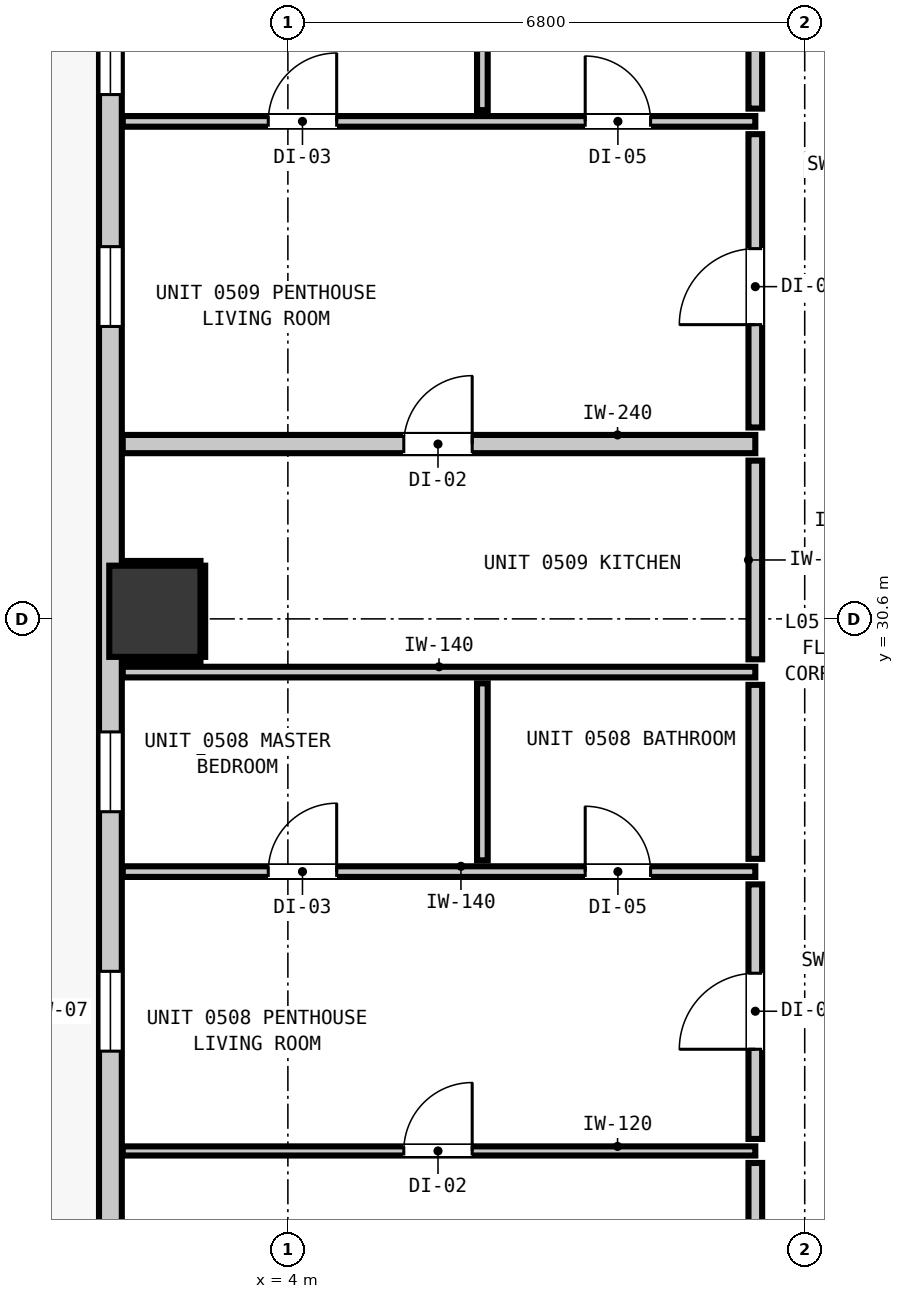
"""IFC4 building model, lengths in metres.
Left out: names, types, materials, properties, quantities, classifications, styles, units other than length and angle.
Written with IfcOpenShell. Run it as: python <this file> out.ifc"""

import sys

from ifc_helpers import new_model, si_unit, direction, frame, frame_2d, origin, origin_2d, place, context, subcontext, project, spatial, rectangle, extrude, element, fill, save


model = new_model("IFC4")
c1 = context("Model", 3, precision=1e-05, world=origin(), true_north=direction((0.0, 1.0)))
c2 = subcontext(c1, "Body", "Model", "MODEL_VIEW")
j1 = project(units=[si_unit("LENGTHUNIT", "METRE"), si_unit("PLANEANGLEUNIT", "RADIAN")], contexts=[c1])
p1 = place(None, origin())
s1 = spatial("IfcSite", under=j1, at=p1, CompositionType="ELEMENT")
p2 = place(p1, origin())
s2 = spatial("IfcBuilding", under=s1, at=p2, CompositionType="ELEMENT")
p3 = place(p2, frame((0.0, 0.0, 22.0)))
s3 = spatial("IfcBuildingStorey", under=s2, at=p3, CompositionType="ELEMENT", Elevation=22.0)
p4 = place(p3, frame((2.25, 30.7, -0.2), z_axis=(0.0, 0.0, 1.0), x_axis=(1.0, 0.0, 0.0)))
e1 = element("IfcColumn", 1, at=p4, inside=s3, PredefinedType="COLUMN", context=c2, shape_type="SweptSolid", body=[
    extrude(rectangle(XDim=1.2, YDim=1.2, at=origin_2d()), origin(), (0.0, 0.0, 1.0), 3.52),
])
p5 = place(p3, frame((1.665, 10.165, 0.0), z_axis=(0.0, 0.0, 1.0), x_axis=(0.0, 1.0, 0.0)))
e2 = element("IfcWall", 2, at=p5, inside=s3, PredefinedType="STANDARD", context=c2, shape_type="SweptSolid", body=[
    extrude(rectangle(XDim=34.67, YDim=0.3, at=frame_2d((17.335, 0.0))), origin(), (0.0, 0.0, 1.0), 3.06),
])
p6 = place(p5, frame((3.352, 0.0, 0.0)))
e3 = element("IfcOpeningElement", 3, at=p6, cuts=e2, PredefinedType="OPENING", context=c2, shape_type="SweptSolid", body=[
    extrude(rectangle(XDim=1.0, YDim=2.15, at=frame_2d((0.5, 1.075))), frame((0.0, 0.16, 0.0), z_axis=(0.0, -1.0, 0.0), x_axis=(1.0, 0.0, 0.0)), (0.0, 0.0, 1.0), 0.32),
])
p7 = place(p5, frame((14.748, 0.0, 0.85)))
e4 = element("IfcOpeningElement", 4, at=p7, cuts=e2, PredefinedType="OPENING", context=c2, shape_type="SweptSolid", body=[
    extrude(rectangle(XDim=1.05, YDim=1.65, at=frame_2d((0.525, 0.825))), frame((0.0, 0.16, 0.0), z_axis=(0.0, -1.0, 0.0), x_axis=(1.0, 0.0, 0.0)), (0.0, 0.0, 1.0), 0.32),
])
p8 = place(p5, frame((17.898, 0.0, 0.85)))
e5 = element("IfcOpeningElement", 5, at=p8, cuts=e2, PredefinedType="OPENING", context=c2, shape_type="SweptSolid", body=[
    extrude(rectangle(XDim=1.05, YDim=1.65, at=frame_2d((0.525, 0.825))), frame((0.0, 0.16, 0.0), z_axis=(0.0, -1.0, 0.0), x_axis=(1.0, 0.0, 0.0)), (0.0, 0.0, 1.0), 0.32),
])
p9 = place(p5, frame((24.282, 0.0, 0.85)))
e6 = element("IfcOpeningElement", 6, at=p9, cuts=e2, PredefinedType="OPENING", context=c2, shape_type="SweptSolid", body=[
    extrude(rectangle(XDim=1.05, YDim=1.65, at=frame_2d((0.525, 0.825))), frame((0.0, 0.16, 0.0), z_axis=(0.0, -1.0, 0.0), x_axis=(1.0, 0.0, 0.0)), (0.0, 0.0, 1.0), 0.32),
])
p10 = place(p5, frame((27.333, 0.0, 0.85)))
e7 = element("IfcOpeningElement", 7, at=p10, cuts=e2, PredefinedType="OPENING", context=c2, shape_type="SweptSolid", body=[
    extrude(rectangle(XDim=1.05, YDim=1.65, at=frame_2d((0.525, 0.825))), frame((0.0, 0.16, 0.0), z_axis=(0.0, -1.0, 0.0), x_axis=(1.0, 0.0, 0.0)), (0.0, 0.0, 1.0), 0.32),
])
p11 = place(p3, frame((1.827, 32.9, 0.0), z_axis=(0.0, 0.0, 1.0), x_axis=(1.0, 0.0, 0.0)))
e8 = element("IfcWall", 8, at=p11, inside=s3, PredefinedType="PARTITIONING", context=c2, shape_type="SweptSolid", body=[
    extrude(rectangle(XDim=8.323, YDim=0.24, at=frame_2d((4.162, 0.0))), origin(), (0.0, 0.0, 1.0), 3.06),
])
p12 = place(p11, frame((3.698, 0.0, 0.0)))
e9 = element("IfcOpeningElement", 9, at=p12, cuts=e8, PredefinedType="OPENING", context=c2, shape_type="SweptSolid", body=[
    extrude(rectangle(XDim=0.9, YDim=2.1, at=frame_2d((0.45, 1.05))), frame((0.0, 0.13, 0.0), z_axis=(0.0, -1.0, 0.0), x_axis=(1.0, 0.0, 0.0)), (0.0, 0.0, 1.0), 0.26),
])
p13 = place(p3, frame((1.827, 27.275, 0.0), z_axis=(0.0, 0.0, 1.0), x_axis=(1.0, 0.0, 0.0)))
e10 = element("IfcWall", 10, at=p13, inside=s3, PredefinedType="PARTITIONING", context=c2, shape_type="SweptSolid", body=[
    extrude(rectangle(XDim=8.323, YDim=0.14, at=frame_2d((4.162, 0.0))), origin(), (0.0, 0.0, 1.0), 3.06),
])
p14 = place(p13, frame((6.085, 0.0, 0.0)))
e11 = element("IfcOpeningElement", 11, at=p14, cuts=e10, PredefinedType="OPENING", context=c2, shape_type="SweptSolid", body=[
    extrude(rectangle(XDim=0.86, YDim=2.02, at=frame_2d((0.43, 1.01))), frame((0.0, 0.08, 0.0), z_axis=(0.0, -1.0, 0.0), x_axis=(1.0, 0.0, 0.0)), (0.0, 0.0, 1.0), 0.16),
])
p15 = place(p13, frame((1.915, 0.0, 0.0)))
e12 = element("IfcOpeningElement", 12, at=p15, cuts=e10, PredefinedType="OPENING", context=c2, shape_type="SweptSolid", body=[
    extrude(rectangle(XDim=0.9, YDim=2.1, at=frame_2d((0.45, 1.05))), frame((0.0, 0.08, 0.0), z_axis=(0.0, -1.0, 0.0), x_axis=(1.0, 0.0, 0.0)), (0.0, 0.0, 1.0), 0.16),
])
p16 = place(p3, frame((1.827, 29.9, 0.0), z_axis=(0.0, 0.0, 1.0), x_axis=(1.0, 0.0, 0.0)))
e13 = element("IfcWall", 13, at=p16, inside=s3, PredefinedType="PARTITIONING", context=c2, shape_type="SweptSolid", body=[
    extrude(rectangle(XDim=8.323, YDim=0.14, at=frame_2d((4.162, 0.0))), origin(), (0.0, 0.0, 1.0), 3.06),
])
p17 = place(p3, frame((1.827, 37.145, 0.0), z_axis=(0.0, 0.0, 1.0), x_axis=(1.0, 0.0, 0.0)))
e14 = element("IfcWall", 14, at=p17, inside=s3, PredefinedType="PARTITIONING", context=c2, shape_type="SweptSolid", body=[
    extrude(rectangle(XDim=8.323, YDim=0.14, at=frame_2d((4.162, 0.0))), origin(), (0.0, 0.0, 1.0), 3.06),
])
p18 = place(p17, frame((6.085, 0.0, 0.0)))
e15 = element("IfcOpeningElement", 15, at=p18, cuts=e14, PredefinedType="OPENING", context=c2, shape_type="SweptSolid", body=[
    extrude(rectangle(XDim=0.86, YDim=2.02, at=frame_2d((0.43, 1.01))), frame((0.0, 0.08, 0.0), z_axis=(0.0, -1.0, 0.0), x_axis=(1.0, 0.0, 0.0)), (0.0, 0.0, 1.0), 0.16),
])
p19 = place(p17, frame((1.915, 0.0, 0.0)))
e16 = element("IfcOpeningElement", 16, at=p19, cuts=e14, PredefinedType="OPENING", context=c2, shape_type="SweptSolid", body=[
    extrude(rectangle(XDim=0.9, YDim=2.1, at=frame_2d((0.45, 1.05))), frame((0.0, 0.08, 0.0), z_axis=(0.0, -1.0, 0.0), x_axis=(1.0, 0.0, 0.0)), (0.0, 0.0, 1.0), 0.16),
])
p20 = place(p3, frame((1.827, 23.6, 0.0), z_axis=(0.0, 0.0, 1.0), x_axis=(1.0, 0.0, 0.0)))
e17 = element("IfcWall", 17, at=p20, inside=s3, PredefinedType="PARTITIONING", context=c2, shape_type="SweptSolid", body=[
    extrude(rectangle(XDim=8.323, YDim=0.12, at=frame_2d((4.162, 0.0))), origin(), (0.0, 0.0, 1.0), 3.06),
])
p21 = place(p20, frame((3.698, 0.0, 0.0)))
e18 = element("IfcOpeningElement", 18, at=p21, cuts=e17, PredefinedType="OPENING", context=c2, shape_type="SweptSolid", body=[
    extrude(rectangle(XDim=0.9, YDim=2.1, at=frame_2d((0.45, 1.05))), frame((0.0, 0.07, 0.0), z_axis=(0.0, -1.0, 0.0), x_axis=(1.0, 0.0, 0.0)), (0.0, 0.0, 1.0), 0.14),
])
p22 = place(p3, frame((10.15, 21.368, 0.0), z_axis=(0.0, 0.0, 1.0), x_axis=(0.0, 1.0, 0.0)))
e19 = element("IfcWall", 19, at=p22, inside=s3, PredefinedType="PARTITIONING", context=c2, shape_type="SweptSolid", body=[
    extrude(rectangle(XDim=2.074, YDim=0.18, at=frame_2d((1.037, 0.0))), origin(), (0.0, 0.0, 1.0), 3.06),
])
p23 = place(p3, frame((10.15, 23.758, 0.0), z_axis=(0.0, 0.0, 1.0), x_axis=(0.0, 1.0, 0.0)))
e20 = element("IfcWall", 20, at=p23, inside=s3, PredefinedType="PARTITIONING", context=c2, shape_type="SweptSolid", body=[
    extrude(rectangle(XDim=3.349, YDim=0.18, at=frame_2d((1.674, 0.0))), origin(), (0.0, 0.0, 1.0), 3.06),
])
p24 = place(p23, frame((1.18, 0.0, 0.0)))
e21 = element("IfcOpeningElement", 21, at=p24, cuts=e20, PredefinedType="OPENING", context=c2, shape_type="SweptSolid", body=[
    extrude(rectangle(XDim=1.0, YDim=2.15, at=frame_2d((0.5, 1.075))), frame((0.0, 0.1, 0.0), z_axis=(0.0, -1.0, 0.0), x_axis=(1.0, 0.0, 0.0)), (0.0, 0.0, 1.0), 0.2),
])
p25 = place(p3, frame((10.15, 27.443, 0.0), z_axis=(0.0, 0.0, 1.0), x_axis=(0.0, 1.0, 0.0)))
e22 = element("IfcWall", 22, at=p25, inside=s3, PredefinedType="PARTITIONING", context=c2, shape_type="SweptSolid", body=[
    extrude(rectangle(XDim=2.289, YDim=0.18, at=frame_2d((1.145, 0.0))), origin(), (0.0, 0.0, 1.0), 3.06),
])
p26 = place(p3, frame((10.15, 30.068, 0.0), z_axis=(0.0, 0.0, 1.0), x_axis=(0.0, 1.0, 0.0)))
e23 = element("IfcWall", 23, at=p26, inside=s3, PredefinedType="PARTITIONING", context=c2, shape_type="SweptSolid", body=[
    extrude(rectangle(XDim=2.614, YDim=0.18, at=frame_2d((1.307, 0.0))), origin(), (0.0, 0.0, 1.0), 3.06),
])
p27 = place(p3, frame((10.15, 33.118, 0.0), z_axis=(0.0, 0.0, 1.0), x_axis=(0.0, 1.0, 0.0)))
e24 = element("IfcWall", 24, at=p27, inside=s3, PredefinedType="PARTITIONING", context=c2, shape_type="SweptSolid", body=[
    extrude(rectangle(XDim=3.859, YDim=0.18, at=frame_2d((1.93, 0.0))), origin(), (0.0, 0.0, 1.0), 3.06),
])
p28 = place(p27, frame((1.353, 0.0, 0.0)))
e25 = element("IfcOpeningElement", 25, at=p28, cuts=e24, PredefinedType="OPENING", context=c2, shape_type="SweptSolid", body=[
    extrude(rectangle(XDim=1.0, YDim=2.15, at=frame_2d((0.5, 1.075))), frame((0.0, 0.1, 0.0), z_axis=(0.0, -1.0, 0.0), x_axis=(1.0, 0.0, 0.0)), (0.0, 0.0, 1.0), 0.2),
])
p29 = place(p3, frame((10.15, 37.313, 0.0), z_axis=(0.0, 0.0, 1.0), x_axis=(0.0, 1.0, 0.0)))
e26 = element("IfcWall", 26, at=p29, inside=s3, PredefinedType="PARTITIONING", context=c2, shape_type="SweptSolid", body=[
    extrude(rectangle(XDim=2.749, YDim=0.18, at=frame_2d((1.375, 0.0))), origin(), (0.0, 0.0, 1.0), 3.06),
])
p30 = place(p3, frame((6.559, 27.423, 0.0), z_axis=(0.0, 0.0, 1.0), x_axis=(0.0, 1.0, 0.0)))
e27 = element("IfcWall", 27, at=p30, inside=s3, PredefinedType="PARTITIONING", context=c2, shape_type="SweptSolid", body=[
    extrude(rectangle(XDim=2.329, YDim=0.14, at=frame_2d((1.165, 0.0))), origin(), (0.0, 0.0, 1.0), 3.06),
])
p31 = place(p3, frame((6.559, 37.293, 0.0), z_axis=(0.0, 0.0, 1.0), x_axis=(0.0, 1.0, 0.0)))
e28 = element("IfcWall", 28, at=p31, inside=s3, PredefinedType="PARTITIONING", context=c2, shape_type="SweptSolid", body=[
    extrude(rectangle(XDim=2.789, YDim=0.14, at=frame_2d((1.395, 0.0))), origin(), (0.0, 0.0, 1.0), 3.06),
])
for number, where, z_axis, x_axis in (
    (29, (1.83, 30.068, 0.0), (0.0, 0.0, 1.0), (1.0, 0.0, 0.0)),
    (30, (1.83, 31.332, 0.0), (0.0, 0.0, 1.0), (1.0, 0.0, 0.0)),
):
    element("IfcWall", number, at=place(p3, frame(where, z_axis=z_axis, x_axis=x_axis)), inside=s3, PredefinedType="PARTITIONING", context=c2, shape_type="SweptSolid", body=[
        extrude(rectangle(XDim=1.02, YDim=0.06, at=frame_2d((0.51, 0.0))), origin(), (0.0, 0.0, 1.0), 1.45),
    ])
p32 = place(p3, frame((2.882, 30.1, 0.0), z_axis=(0.0, 0.0, 1.0), x_axis=(0.0, 1.0, 0.0)))
e31 = element("IfcWall", 31, at=p32, inside=s3, PredefinedType="PARTITIONING", context=c2, shape_type="SweptSolid", body=[
    extrude(rectangle(XDim=1.2, YDim=0.06, at=frame_2d((0.6, 0.0))), origin(), (0.0, 0.0, 1.0), 1.45),
])
p33 = place(p7, origin())
e32 = element("IfcWindow", 32, at=p33, inside=s3, PartitioningType="SINGLE_PANEL", PredefinedType="WINDOW", context=c2, shape_type="SweptSolid", body=[
    extrude(rectangle(XDim=1.05, YDim=1.65, at=frame_2d((0.525, 0.825))), frame((0.0, 0.03, 0.0), z_axis=(0.0, -1.0, 0.0), x_axis=(1.0, 0.0, 0.0)), (0.0, 0.0, 1.0), 0.06),
])
fill(e4, e32)
p34 = place(p8, origin())
e33 = element("IfcWindow", 33, at=p34, inside=s3, PartitioningType="SINGLE_PANEL", PredefinedType="WINDOW", context=c2, shape_type="SweptSolid", body=[
    extrude(rectangle(XDim=1.05, YDim=1.65, at=frame_2d((0.525, 0.825))), frame((0.0, 0.03, 0.0), z_axis=(0.0, -1.0, 0.0), x_axis=(1.0, 0.0, 0.0)), (0.0, 0.0, 1.0), 0.06),
])
fill(e5, e33)
p35 = place(p9, origin())
e34 = element("IfcWindow", 34, at=p35, inside=s3, PartitioningType="SINGLE_PANEL", PredefinedType="WINDOW", context=c2, shape_type="SweptSolid", body=[
    extrude(rectangle(XDim=1.05, YDim=1.65, at=frame_2d((0.525, 0.825))), frame((0.0, 0.03, 0.0), z_axis=(0.0, -1.0, 0.0), x_axis=(1.0, 0.0, 0.0)), (0.0, 0.0, 1.0), 0.06),
])
fill(e6, e34)
p36 = place(p10, origin())
e35 = element("IfcWindow", 35, at=p36, inside=s3, PartitioningType="SINGLE_PANEL", PredefinedType="WINDOW", context=c2, shape_type="SweptSolid", body=[
    extrude(rectangle(XDim=1.05, YDim=1.65, at=frame_2d((0.525, 0.825))), frame((0.0, 0.03, 0.0), z_axis=(0.0, -1.0, 0.0), x_axis=(1.0, 0.0, 0.0)), (0.0, 0.0, 1.0), 0.06),
])
fill(e7, e35)
p37 = place(p24, origin())
e36 = element("IfcDoor", 36, at=p37, inside=s3, OperationType="SINGLE_SWING_LEFT", PredefinedType="DOOR", context=c2, shape_type="SweptSolid", body=[
    extrude(rectangle(XDim=1.0, YDim=2.15, at=frame_2d((0.5, 1.075))), frame((0.0, 0.025, 0.0), z_axis=(0.0, -1.0, 0.0), x_axis=(1.0, 0.0, 0.0)), (0.0, 0.0, 1.0), 0.05),
])
fill(e21, e36)
p38 = place(p21, origin())
e37 = element("IfcDoor", 37, at=p38, inside=s3, OperationType="SINGLE_SWING_RIGHT", PredefinedType="DOOR", context=c2, shape_type="SweptSolid", body=[
    extrude(rectangle(XDim=0.9, YDim=2.1, at=frame_2d((0.45, 1.05))), frame((0.0, 0.025, 0.0), z_axis=(0.0, -1.0, 0.0), x_axis=(1.0, 0.0, 0.0)), (0.0, 0.0, 1.0), 0.05),
])
fill(e18, e37)
p39 = place(p14, origin())
e38 = element("IfcDoor", 38, at=p39, inside=s3, OperationType="SINGLE_SWING_LEFT", PredefinedType="DOOR", context=c2, shape_type="SweptSolid", body=[
    extrude(rectangle(XDim=0.86, YDim=2.02, at=frame_2d((0.43, 1.01))), frame((0.0, 0.025, 0.0), z_axis=(0.0, -1.0, 0.0), x_axis=(1.0, 0.0, 0.0)), (0.0, 0.0, 1.0), 0.05),
])
fill(e11, e38)
p40 = place(p15, origin())
e39 = element("IfcDoor", 39, at=p40, inside=s3, OperationType="SINGLE_SWING_RIGHT", PredefinedType="DOOR", context=c2, shape_type="SweptSolid", body=[
    extrude(rectangle(XDim=0.9, YDim=2.1, at=frame_2d((0.45, 1.05))), frame((0.0, 0.025, 0.0), z_axis=(0.0, -1.0, 0.0), x_axis=(1.0, 0.0, 0.0)), (0.0, 0.0, 1.0), 0.05),
])
fill(e12, e39)
p41 = place(p28, origin())
e40 = element("IfcDoor", 40, at=p41, inside=s3, OperationType="SINGLE_SWING_LEFT", PredefinedType="DOOR", context=c2, shape_type="SweptSolid", body=[
    extrude(rectangle(XDim=1.0, YDim=2.15, at=frame_2d((0.5, 1.075))), frame((0.0, 0.025, 0.0), z_axis=(0.0, -1.0, 0.0), x_axis=(1.0, 0.0, 0.0)), (0.0, 0.0, 1.0), 0.05),
])
fill(e25, e40)
p42 = place(p12, origin())
e41 = element("IfcDoor", 41, at=p42, inside=s3, OperationType="SINGLE_SWING_RIGHT", PredefinedType="DOOR", context=c2, shape_type="SweptSolid", body=[
    extrude(rectangle(XDim=0.9, YDim=2.1, at=frame_2d((0.45, 1.05))), frame((0.0, 0.025, 0.0), z_axis=(0.0, -1.0, 0.0), x_axis=(1.0, 0.0, 0.0)), (0.0, 0.0, 1.0), 0.05),
])
fill(e9, e41)
p43 = place(p18, origin())
e42 = element("IfcDoor", 42, at=p43, inside=s3, OperationType="SINGLE_SWING_LEFT", PredefinedType="DOOR", context=c2, shape_type="SweptSolid", body=[
    extrude(rectangle(XDim=0.86, YDim=2.02, at=frame_2d((0.43, 1.01))), frame((0.0, 0.025, 0.0), z_axis=(0.0, -1.0, 0.0), x_axis=(1.0, 0.0, 0.0)), (0.0, 0.0, 1.0), 0.05),
])
fill(e15, e42)
p44 = place(p19, origin())
e43 = element("IfcDoor", 43, at=p44, inside=s3, OperationType="SINGLE_SWING_RIGHT", PredefinedType="DOOR", context=c2, shape_type="SweptSolid", body=[
    extrude(rectangle(XDim=0.9, YDim=2.1, at=frame_2d((0.45, 1.05))), frame((0.0, 0.025, 0.0), z_axis=(0.0, -1.0, 0.0), x_axis=(1.0, 0.0, 0.0)), (0.0, 0.0, 1.0), 0.05),
])
fill(e16, e43)
save(model, sys.argv[1])
